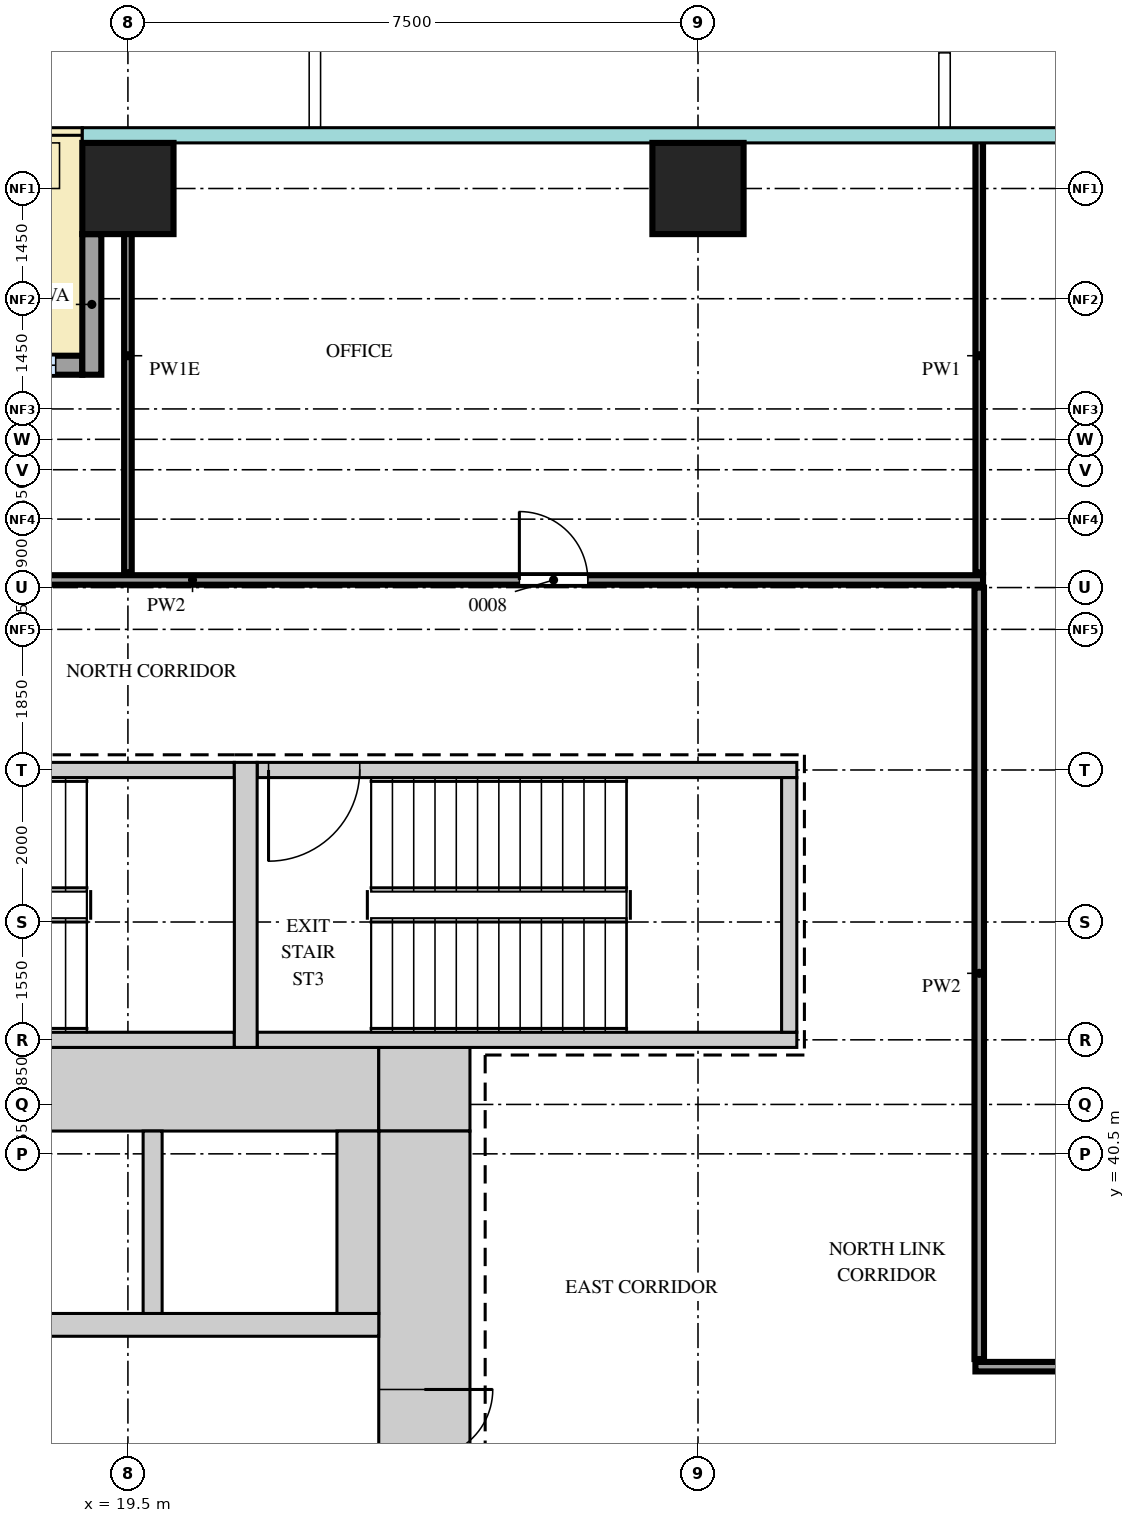
"""IFC4 building model, lengths in metres.
Left out: names, types, materials, properties, quantities, classifications, styles, units other than length and angle.
Written with IfcOpenShell. Run it as: python <this file> out.ifc"""

import sys

from ifc_helpers import new_model, si_unit, direction, frame, frame_2d, origin, origin_2d, place, context, subcontext, project, spatial, rectangle, extrude, source, transform, mapped, element, fill, save


model = new_model("IFC4")
c1 = context("Model", 3, precision=1e-05, world=origin(), true_north=direction((0.0, 1.0)))
c2 = subcontext(c1, "Body", "Model", "MODEL_VIEW")
j1 = project(units=[si_unit("LENGTHUNIT", "METRE"), si_unit("PLANEANGLEUNIT", "RADIAN")], contexts=[c1])
p1 = place(None, origin())
s1 = spatial("IfcSite", under=j1, at=p1, CompositionType="ELEMENT")
p2 = place(p1, origin())
s2 = spatial("IfcBuilding", under=s1, at=p2, CompositionType="ELEMENT")
p3 = place(p2, frame((0.0, 0.0, 37.5)))
s3 = spatial("IfcBuildingStorey", under=s2, at=p3, CompositionType="ELEMENT", Elevation=37.5)
m1 = source(origin(), c2, "Body", "SweptSolid", [
    extrude(rectangle(XDim=8.9, YDim=1.1, at=frame_2d((4.45, 0.0))), origin(), (0.0, 0.0, 1.0), 4.2),
])
p4 = place(p3, frame((13.9, 41.35, 0.0), z_axis=(0.0, 0.0, 1.0), x_axis=(1.0, 0.0, 0.0)))
e1 = element("IfcWall", 1, at=p4, inside=s3, PredefinedType="SHEAR", context=c2, shape_type="MappedRepresentation", body=[
    mapped(m1, transform((0.0, 0.0, 0.0))),
])
m2 = source(origin(), c2, "Body", "SweptSolid", [
    extrude(rectangle(XDim=1.2, YDim=1.1, at=frame_2d((0.6, 0.0))), origin(), (0.0, 0.0, 1.0), 4.2),
])
p5 = place(p3, frame((22.8, 41.35, 0.0), z_axis=(0.0, 0.0, 1.0), x_axis=(1.0, 0.0, 0.0)))
e2 = element("IfcWall", 2, at=p5, inside=s3, PredefinedType="SHEAR", context=c2, shape_type="MappedRepresentation", body=[
    mapped(m2, transform((0.0, 0.0, 0.0))),
])
m3 = source(origin(), c2, "Body", "SweptSolid", [
    extrude(rectangle(XDim=27.6, YDim=1.2, at=frame_2d((13.8, 0.0))), origin(), (0.0, 0.0, 1.0), 4.2),
])
p6 = place(p3, frame((23.4, 13.2, 0.0), z_axis=(0.0, 0.0, 1.0), x_axis=(0.0, 1.0, 0.0)))
e3 = element("IfcWall", 3, at=p6, inside=s3, PredefinedType="SHEAR", context=c2, shape_type="MappedRepresentation", body=[
    mapped(m3, transform((0.0, 0.0, 0.0))),
])
m4 = source(origin(), c2, "Body", "SweptSolid", [
    extrude(rectangle(XDim=1.8, YDim=2.1, at=frame_2d((0.9, 1.05))), frame((0.0, 0.61, 0.0), z_axis=(0.0, -1.0, 0.0), x_axis=(1.0, 0.0, 0.0)), (0.0, 0.0, 1.0), 1.22),
])
p7 = place(p6, frame((22.4, 0.0, 0.0)))
e4 = element("IfcOpeningElement", 4, at=p7, cuts=e3, PredefinedType="OPENING", context=c2, shape_type="MappedRepresentation", body=[
    mapped(m4, transform((0.0, 0.0, 0.0))),
])
m5 = source(origin(), c2, "Body", "SweptSolid", [
    extrude(rectangle(XDim=1.2, YDim=2.1, at=frame_2d((0.6, 1.05))), frame((0.0, 0.61, 0.0), z_axis=(0.0, -1.0, 0.0), x_axis=(1.0, 0.0, 0.0)), (0.0, 0.0, 1.0), 1.22),
])
p8 = place(p6, frame((13.65, 0.0, 0.0)))
e5 = element("IfcOpeningElement", 5, at=p8, cuts=e3, PredefinedType="OPENING", context=c2, shape_type="MappedRepresentation", body=[
    mapped(m5, transform((0.0, 0.0, 0.0))),
])
m6 = source(origin(), c2, "Body", "SweptSolid", [
    extrude(rectangle(XDim=0.9, YDim=2.1, at=frame_2d((0.45, 1.05))), frame((0.0, 0.61, 0.0), z_axis=(0.0, -1.0, 0.0), x_axis=(1.0, 0.0, 0.0)), (0.0, 0.0, 1.0), 1.22),
])
p9 = place(p6, frame((1.95, 0.0, 0.0)))
e6 = element("IfcOpeningElement", 6, at=p9, cuts=e3, PredefinedType="OPENING", context=c2, shape_type="MappedRepresentation", body=[
    mapped(m6, transform((0.0, 0.0, 0.0))),
])
p10 = place(p6, frame((6.8, 0.0, 0.0)))
e7 = element("IfcOpeningElement", 7, at=p10, cuts=e3, PredefinedType="OPENING", context=c2, shape_type="MappedRepresentation", body=[
    mapped(m6, transform((0.0, 0.0, 0.0))),
])
m7 = source(origin(), c2, "Body", "SweptSolid", [
    extrude(rectangle(XDim=7.0, YDim=0.2, at=frame_2d((3.5, 0.0))), origin(), (0.0, 0.0, 1.0), 4.2),
])
p11 = place(p3, frame((13.9, 45.55, 0.0), z_axis=(0.0, 0.0, 1.0), x_axis=(1.0, 0.0, 0.0)))
e8 = element("IfcWall", 8, at=p11, inside=s3, PredefinedType="SHEAR", context=c2, shape_type="MappedRepresentation", body=[
    mapped(m7, transform((0.0, 0.0, 0.0))),
])
m8 = source(origin(), c2, "Body", "SweptSolid", [
    extrude(rectangle(XDim=1.2, YDim=2.1, at=frame_2d((0.6, 1.05))), frame((0.0, 0.11, 0.0), z_axis=(0.0, -1.0, 0.0), x_axis=(1.0, 0.0, 0.0)), (0.0, 0.0, 1.0), 0.22),
])
p12 = place(p11, frame((0.35, 0.0, 0.0)))
e9 = element("IfcOpeningElement", 9, at=p12, cuts=e8, PredefinedType="OPENING", context=c2, shape_type="MappedRepresentation", body=[
    mapped(m8, transform((0.0, 0.0, 0.0))),
])
p13 = place(p3, frame((13.9, 42.0, 0.0), z_axis=(0.0, 0.0, 1.0), x_axis=(1.0, 0.0, 0.0)))
e10 = element("IfcWall", 10, at=p13, inside=s3, PredefinedType="SHEAR", context=c2, shape_type="MappedRepresentation", body=[
    mapped(m7, transform((0.0, 0.0, 0.0))),
])
m9 = source(origin(), c2, "Body", "SweptSolid", [
    extrude(rectangle(XDim=7.1, YDim=0.2, at=frame_2d((3.55, 0.0))), origin(), (0.0, 0.0, 1.0), 4.2),
])
p14 = place(p3, frame((21.2, 45.55, 0.0), z_axis=(0.0, 0.0, 1.0), x_axis=(1.0, 0.0, 0.0)))
e11 = element("IfcWall", 11, at=p14, inside=s3, PredefinedType="SHEAR", context=c2, shape_type="MappedRepresentation", body=[
    mapped(m9, transform((0.0, 0.0, 0.0))),
])
p15 = place(p14, frame((0.15, 0.0, 0.0)))
e12 = element("IfcOpeningElement", 12, at=p15, cuts=e11, PredefinedType="OPENING", context=c2, shape_type="MappedRepresentation", body=[
    mapped(m8, transform((0.0, 0.0, 0.0))),
])
p16 = place(p3, frame((21.2, 42.0, 0.0), z_axis=(0.0, 0.0, 1.0), x_axis=(1.0, 0.0, 0.0)))
e13 = element("IfcWall", 13, at=p16, inside=s3, PredefinedType="SHEAR", context=c2, shape_type="MappedRepresentation", body=[
    mapped(m9, transform((0.0, 0.0, 0.0))),
])
m10 = source(origin(), c2, "Body", "SweptSolid", [
    extrude(rectangle(XDim=3.75, YDim=0.3, at=frame_2d((1.875, 0.0))), origin(), (0.0, 0.0, 1.0), 4.2),
])
p17 = place(p3, frame((21.05, 41.9, 0.0), z_axis=(0.0, 0.0, 1.0), x_axis=(0.0, 1.0, 0.0)))
e14 = element("IfcWall", 14, at=p17, inside=s3, PredefinedType="SHEAR", context=c2, shape_type="MappedRepresentation", body=[
    mapped(m10, transform((0.0, 0.0, 0.0))),
])
m11 = source(origin(), c2, "Body", "SweptSolid", [
    extrude(rectangle(XDim=3.35, YDim=0.2, at=frame_2d((1.675, 0.0))), origin(), (0.0, 0.0, 1.0), 4.2),
])
p18 = place(p3, frame((28.2, 42.1, 0.0), z_axis=(0.0, 0.0, 1.0), x_axis=(0.0, 1.0, 0.0)))
e15 = element("IfcWall", 15, at=p18, inside=s3, PredefinedType="SHEAR", context=c2, shape_type="MappedRepresentation", body=[
    mapped(m11, transform((0.0, 0.0, 0.0))),
])
m12 = source(origin(), c2, "Body", "SweptSolid", [
    extrude(rectangle(XDim=15.6, YDim=0.3, at=frame_2d((7.8, 0.0))), origin(), (0.0, 0.0, 1.0), 4.2),
])
p19 = place(p3, frame((7.2, 38.25, 0.0), z_axis=(0.0, 0.0, 1.0), x_axis=(1.0, 0.0, 0.0)))
e16 = element("IfcWall", 16, at=p19, inside=s3, PredefinedType="STANDARD", context=c2, shape_type="MappedRepresentation", body=[
    mapped(m12, transform((0.0, 0.0, 0.0))),
])
m13 = source(origin(), c2, "Body", "SweptSolid", [
    extrude(rectangle(XDim=1.2, YDim=2.1, at=frame_2d((0.6, 1.05))), frame((0.0, 0.16, 0.0), z_axis=(0.0, -1.0, 0.0), x_axis=(1.0, 0.0, 0.0)), (0.0, 0.0, 1.0), 0.32),
])
p20 = place(p19, frame((0.55, 0.0, 0.0)))
e17 = element("IfcOpeningElement", 17, at=p20, cuts=e16, PredefinedType="OPENING", context=c2, shape_type="MappedRepresentation", body=[
    mapped(m13, transform((0.0, 0.0, 0.0))),
])
p21 = place(p19, frame((3.1, 0.0, 0.0)))
e18 = element("IfcOpeningElement", 18, at=p21, cuts=e16, PredefinedType="OPENING", context=c2, shape_type="MappedRepresentation", body=[
    mapped(m13, transform((0.0, 0.0, 0.0))),
])
p22 = place(p19, frame((5.65, 0.0, 0.0)))
e19 = element("IfcOpeningElement", 19, at=p22, cuts=e16, PredefinedType="OPENING", context=c2, shape_type="MappedRepresentation", body=[
    mapped(m13, transform((0.0, 0.0, 0.0))),
])
p23 = place(p19, frame((8.2, 0.0, 0.0)))
e20 = element("IfcOpeningElement", 20, at=p23, cuts=e16, PredefinedType="OPENING", context=c2, shape_type="MappedRepresentation", body=[
    mapped(m13, transform((0.0, 0.0, 0.0))),
])
m14 = source(origin(), c2, "Body", "SweptSolid", [
    extrude(rectangle(XDim=2.4, YDim=0.25, at=frame_2d((1.2, 0.0))), origin(), (0.0, 0.0, 1.0), 4.2),
])
p24 = place(p3, frame((19.825, 38.4, 0.0), z_axis=(0.0, 0.0, 1.0), x_axis=(0.0, 1.0, 0.0)))
e21 = element("IfcWall", 21, at=p24, inside=s3, PredefinedType="STANDARD", context=c2, shape_type="MappedRepresentation", body=[
    mapped(m14, transform((0.0, 0.0, 0.0))),
])
m15 = source(origin(), c2, "Body", "SweptSolid", [
    extrude(rectangle(XDim=2.4, YDim=0.55, at=frame_2d((1.2, 0.0))), origin(), (0.0, 0.0, 1.0), 4.2),
])
p25 = place(p3, frame((22.525, 38.4, 0.0), z_axis=(0.0, 0.0, 1.0), x_axis=(0.0, 1.0, 0.0)))
e22 = element("IfcWall", 22, at=p25, inside=s3, PredefinedType="STANDARD", context=c2, shape_type="MappedRepresentation", body=[
    mapped(m15, transform((0.0, 0.0, 0.0))),
])
m16 = source(origin(), c2, "Body", "SweptSolid", [
    extrude(rectangle(XDim=1.2, YDim=1.2, at=origin_2d()), origin(), (0.0, 0.0, 1.0), 4.2),
])
for number, where, z_axis, x_axis in (
    (23, (19.5, 53.2, 0.0), (0.0, 0.0, 1.0), (1.0, 0.0, 0.0)),
    (24, (27.0, 53.2, 0.0), (0.0, 0.0, 1.0), (1.0, 0.0, 0.0)),
):
    element("IfcColumn", number, at=place(p3, frame(where, z_axis=z_axis, x_axis=x_axis)), inside=s3, PredefinedType="COLUMN", context=c2, shape_type="MappedRepresentation", body=[
        mapped(m16, transform((0.0, 0.0, 0.0))),
    ])
m17 = source(origin(), c2, "Body", "SweptSolid", [
    extrude(rectangle(XDim=6.3, YDim=0.25, at=frame_2d((3.15, 0.0))), origin(), (0.0, 0.0, 1.0), 4.2),
])
p26 = place(p3, frame((12.6, 50.875, 0.0), z_axis=(0.0, 0.0, 1.0), x_axis=(1.0, 0.0, 0.0)))
e25 = element("IfcWall", 25, at=p26, inside=s3, PredefinedType="SOLIDWALL", context=c2, shape_type="MappedRepresentation", body=[
    mapped(m17, transform((0.0, 0.0, 0.0))),
])
m18 = source(origin(), c2, "Body", "SweptSolid", [
    extrude(rectangle(XDim=1.6, YDim=2.4, at=frame_2d((0.8, 1.2))), frame((0.0, 0.135, 0.0), z_axis=(0.0, -1.0, 0.0), x_axis=(1.0, 0.0, 0.0)), (0.0, 0.0, 1.0), 0.27),
])
p27 = place(p26, frame((0.35, 0.0, 0.0)))
e26 = element("IfcOpeningElement", 26, at=p27, cuts=e25, PredefinedType="OPENING", context=c2, shape_type="MappedRepresentation", body=[
    mapped(m18, transform((0.0, 0.0, 0.0))),
])
p28 = place(p26, frame((4.35, 0.0, 0.0)))
e27 = element("IfcOpeningElement", 27, at=p28, cuts=e25, PredefinedType="OPENING", context=c2, shape_type="MappedRepresentation", body=[
    mapped(m18, transform((0.0, 0.0, 0.0))),
])
m19 = source(origin(), c2, "Body", "SweptSolid", [
    extrude(rectangle(XDim=1.8, YDim=2.4, at=frame_2d((0.9, 1.2))), frame((0.0, 0.135, 0.0), z_axis=(0.0, -1.0, 0.0), x_axis=(1.0, 0.0, 0.0)), (0.0, 0.0, 1.0), 0.27),
])
p29 = place(p26, frame((2.25, 0.0, 0.0)))
e28 = element("IfcOpeningElement", 28, at=p29, cuts=e25, PredefinedType="OPENING", context=c2, shape_type="MappedRepresentation", body=[
    mapped(m19, transform((0.0, 0.0, 0.0))),
])
m20 = source(origin(), c2, "Body", "SweptSolid", [
    extrude(rectangle(XDim=1.85, YDim=0.25, at=frame_2d((0.925, 0.0))), origin(), (0.0, 0.0, 1.0), 3.9),
])
p30 = place(p3, frame((19.025, 52.6, 0.0), z_axis=(0.0, 0.0, 1.0), x_axis=(0.0, -1.0, 0.0)))
e29 = element("IfcWall", 29, at=p30, inside=s3, PredefinedType="SOLIDWALL", context=c2, shape_type="MappedRepresentation", body=[
    mapped(m20, transform((0.0, 0.0, 0.0))),
])
m21 = source(origin(), c2, "Body", "SweptSolid", [
    extrude(rectangle(XDim=23.2, YDim=0.125, at=frame_2d((11.6, 0.0))), origin(), (0.0, 0.0, 1.0), 4.3),
])
p31 = place(p3, frame((30.65, 37.7, 0.0), z_axis=(0.0, 0.0, 1.0), x_axis=(1.0, 0.0, 0.0)))
e30 = element("IfcWall", 30, at=p31, inside=s3, PredefinedType="PARTITIONING", context=c2, shape_type="MappedRepresentation", body=[
    mapped(m21, transform((0.0, 0.0, 0.0))),
])
m22 = source(origin(), c2, "Body", "SweptSolid", [
    extrude(rectangle(XDim=1.2, YDim=2.1, at=frame_2d((0.6, 1.05))), frame((0.0, 0.073, 0.0), z_axis=(0.0, -1.0, 0.0), x_axis=(1.0, 0.0, 0.0)), (0.0, 0.0, 1.0), 0.145),
])
p32 = place(p31, frame((5.25, 0.0, 0.0)))
e31 = element("IfcOpeningElement", 31, at=p32, cuts=e30, PredefinedType="OPENING", context=c2, shape_type="MappedRepresentation", body=[
    mapped(m22, transform((0.0, 0.0, 0.0))),
])
p33 = place(p31, frame((16.75, 0.0, 0.0)))
e32 = element("IfcOpeningElement", 32, at=p33, cuts=e30, PredefinedType="OPENING", context=c2, shape_type="MappedRepresentation", body=[
    mapped(m22, transform((0.0, 0.0, 0.0))),
])
m23 = source(origin(), c2, "Body", "SweptSolid", [
    extrude(rectangle(XDim=10.15, YDim=0.125, at=frame_2d((5.075, 0.0))), origin(), (0.0, 0.0, 1.0), 4.3),
])
p34 = place(p3, frame((30.7, 37.8, 0.0), z_axis=(0.0, 0.0, 1.0), x_axis=(0.0, 1.0, 0.0)))
e33 = element("IfcWall", 33, at=p34, inside=s3, PredefinedType="PARTITIONING", context=c2, shape_type="MappedRepresentation", body=[
    mapped(m23, transform((0.0, 0.0, 0.0))),
])
m24 = source(origin(), c2, "Body", "SweptSolid", [
    extrude(rectangle(XDim=26.45, YDim=0.125, at=frame_2d((13.225, 0.0))), origin(), (0.0, 0.0, 1.0), 4.3),
])
p35 = place(p3, frame((4.3, 48.05, 0.0), z_axis=(0.0, 0.0, 1.0), x_axis=(1.0, 0.0, 0.0)))
e34 = element("IfcWall", 34, at=p35, inside=s3, PredefinedType="PARTITIONING", context=c2, shape_type="MappedRepresentation", body=[
    mapped(m24, transform((0.0, 0.0, 0.0))),
])
m25 = source(origin(), c2, "Body", "SweptSolid", [
    extrude(rectangle(XDim=0.9, YDim=2.1, at=frame_2d((0.45, 1.05))), frame((0.0, 0.073, 0.0), z_axis=(0.0, -1.0, 0.0), x_axis=(1.0, 0.0, 0.0)), (0.0, 0.0, 1.0), 0.145),
])
p36 = place(p35, frame((3.35, 0.0, 0.0)))
e35 = element("IfcOpeningElement", 35, at=p36, cuts=e34, PredefinedType="OPENING", context=c2, shape_type="MappedRepresentation", body=[
    mapped(m25, transform((0.0, 0.0, 0.0))),
])
p37 = place(p35, frame((10.85, 0.0, 0.0)))
e36 = element("IfcOpeningElement", 36, at=p37, cuts=e34, PredefinedType="OPENING", context=c2, shape_type="MappedRepresentation", body=[
    mapped(m25, transform((0.0, 0.0, 0.0))),
])
p38 = place(p35, frame((20.35, 0.0, 0.0)))
e37 = element("IfcOpeningElement", 37, at=p38, cuts=e34, PredefinedType="OPENING", context=c2, shape_type="MappedRepresentation", body=[
    mapped(m25, transform((0.0, 0.0, 0.0))),
])
m26 = source(origin(), c2, "Body", "SweptSolid", [
    extrude(rectangle(XDim=5.7, YDim=0.1, at=frame_2d((2.85, 0.0))), origin(), (0.0, 0.0, 1.0), 3.84),
])
p39 = place(p3, frame((19.5, 48.15, 0.0), z_axis=(0.0, 0.0, 1.0), x_axis=(0.0, 1.0, 0.0)))
e38 = element("IfcWall", 38, at=p39, inside=s3, PredefinedType="PARTITIONING", context=c2, shape_type="MappedRepresentation", body=[
    mapped(m26, transform((0.0, 0.0, 0.0))),
])
m27 = source(origin(), c2, "Body", "SweptSolid", [
    extrude(rectangle(XDim=5.7, YDim=0.1, at=frame_2d((2.85, 0.0))), origin(), (0.0, 0.0, 1.0), 4.3),
])
p40 = place(p3, frame((30.7, 48.15, 0.0), z_axis=(0.0, 0.0, 1.0), x_axis=(0.0, 1.0, 0.0)))
e39 = element("IfcWall", 39, at=p40, inside=s3, PredefinedType="PARTITIONING", context=c2, shape_type="MappedRepresentation", body=[
    mapped(m27, transform((0.0, 0.0, 0.0))),
])
m28 = source(origin(), c2, "Body", "SweptSolid", [
    extrude(rectangle(XDim=1.6, YDim=2.4, at=frame_2d((0.8, 1.2))), frame((0.0, 0.03, 0.0), z_axis=(0.0, -1.0, 0.0), x_axis=(1.0, 0.0, 0.0)), (0.0, 0.0, 1.0), 0.06),
])
p41 = place(p28, origin())
e40 = element("IfcWindow", 40, at=p41, inside=s3, PartitioningType="SINGLE_PANEL", PredefinedType="WINDOW", context=c2, shape_type="MappedRepresentation", body=[
    mapped(m28, transform((0.0, 0.0, 0.0))),
])
fill(e27, e40)
m29 = source(origin(), c2, "Body", "SweptSolid", [
    extrude(rectangle(XDim=1.8, YDim=2.1, at=frame_2d((0.9, 1.05))), frame((0.0, 0.55, 0.0), z_axis=(0.0, -1.0, 0.0), x_axis=(1.0, 0.0, 0.0)), (0.0, 0.0, 1.0), 1.1),
])
p42 = place(p7, origin())
e41 = element("IfcDoor", 41, at=p42, inside=s3, OperationType="DOUBLE_DOOR_SINGLE_SWING", PredefinedType="DOOR", context=c2, shape_type="MappedRepresentation", body=[
    mapped(m29, transform((0.0, 0.0, 0.0))),
])
fill(e4, e41)
m30 = source(origin(), c2, "Body", "SweptSolid", [
    extrude(rectangle(XDim=0.9, YDim=2.1, at=frame_2d((0.45, 1.05))), frame((0.0, 0.025, 0.0), z_axis=(0.0, -1.0, 0.0), x_axis=(1.0, 0.0, 0.0)), (0.0, 0.0, 1.0), 0.05),
])
p43 = place(p38, origin())
e42 = element("IfcDoor", 42, at=p43, inside=s3, OperationType="SINGLE_SWING_RIGHT", PredefinedType="DOOR", context=c2, shape_type="MappedRepresentation", body=[
    mapped(m30, transform((0.0, 0.0, 0.0))),
])
fill(e37, e42)
m31 = source(origin(), c2, "Body", "SweptSolid", [
    extrude(rectangle(XDim=1.2, YDim=2.1, at=frame_2d((0.6, 1.05))), frame((0.0, 0.025, 0.0), z_axis=(0.0, -1.0, 0.0), x_axis=(1.0, 0.0, 0.0)), (0.0, 0.0, 1.0), 0.05),
])
p44 = place(p15, origin())
e43 = element("IfcDoor", 43, at=p44, inside=s3, OperationType="SINGLE_SWING_LEFT", PredefinedType="DOOR", context=c2, shape_type="MappedRepresentation", body=[
    mapped(m31, transform((0.0, 0.0, 0.0))),
])
fill(e12, e43)
save(model, sys.argv[1])
